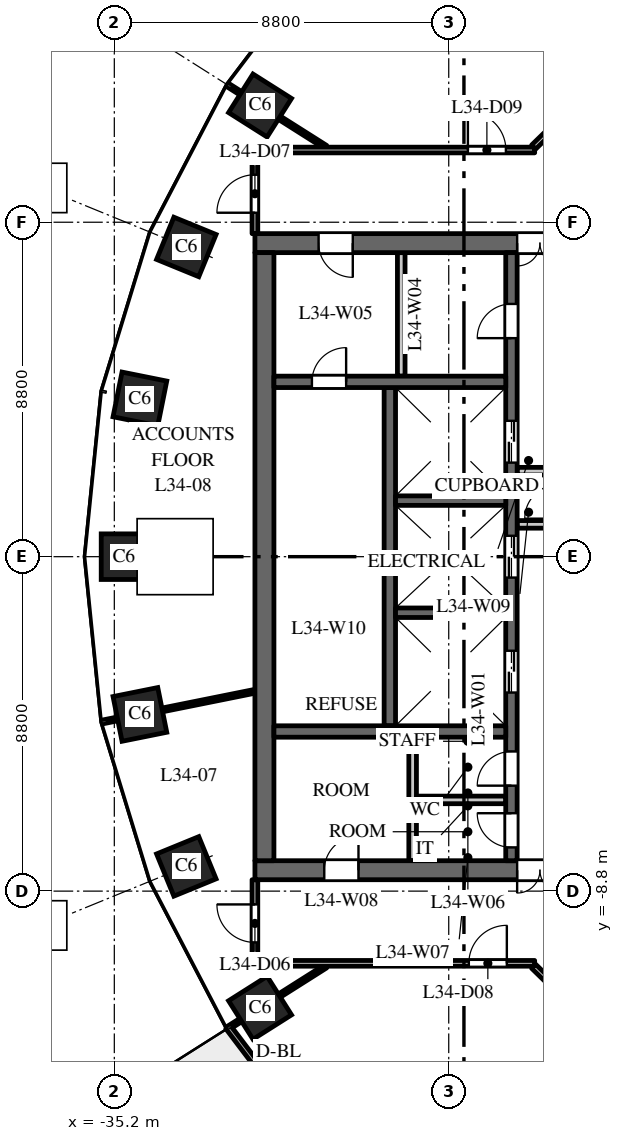
"""IFC4 building model, lengths in metres.
Left out: names, types, materials, properties, quantities, classifications, styles, units other than length and angle.
Written with IfcOpenShell. Run it as: python <this file> out.ifc"""

import sys

from ifc_helpers import new_model, si_unit, direction, frame, frame_2d, origin, origin_2d, place, context, subcontext, project, spatial, rectangle, extrude, element, fill, save


model = new_model("IFC4")
c1 = context("Model", 3, precision=1e-05, world=origin(), true_north=direction((0.0, 1.0)))
c2 = subcontext(c1, "Body", "Model", "MODEL_VIEW")
j1 = project(units=[si_unit("LENGTHUNIT", "METRE"), si_unit("PLANEANGLEUNIT", "RADIAN")], contexts=[c1])
p1 = place(None, origin())
s1 = spatial("IfcSite", under=j1, at=p1, CompositionType="ELEMENT")
p2 = place(p1, origin())
s2 = spatial("IfcBuilding", under=s1, at=p2, CompositionType="ELEMENT")
p3 = place(p2, frame((0.0, 0.0, 150.0)))
s3 = spatial("IfcBuildingStorey", under=s2, at=p3, CompositionType="ELEMENT", Elevation=150.0)
for number, where, z_axis, x_axis in (
    (1, (-31.365, 11.871, 0.0), (0.0, 0.0, 1.0), (-0.535, -0.845, 0.0)),
    (2, (-33.305, 8.149, 0.0), (0.0, 0.0, 1.0), (-0.379, -0.925, 0.0)),
    (3, (-34.527, 4.151, 0.0), (0.0, 0.0, 1.0), (-0.197, -0.98, 0.0)),
    (4, (-34.945, 0.0, 0.0), (0.0, 0.0, 1.0), (0.0, -1.0, 0.0)),
    (5, (-34.527, -4.151, 0.0), (0.0, 0.0, 1.0), (0.197, -0.98, 0.0)),
    (6, (-33.305, -8.149, 0.0), (0.0, 0.0, 1.0), (0.379, -0.925, 0.0)),
    (7, (-31.365, -11.871, 0.0), (0.0, 0.0, 1.0), (0.535, -0.845, 0.0)),
):
    element("IfcColumn", number, at=place(p3, frame(where, z_axis=z_axis, x_axis=x_axis)), inside=s3, PredefinedType="COLUMN", context=c2, shape_type="SweptSolid", body=[
        extrude(rectangle(XDim=1.2, YDim=1.2, at=origin_2d()), origin(), (0.0, 0.0, 1.0), 4.0),
    ])
p4 = place(p3, frame((-16.5, 8.25, 0.0), z_axis=(0.0, 0.0, 1.0), x_axis=(-1.0, 0.0, 0.0)))
e8 = element("IfcWall", 8, at=p4, inside=s3, PredefinedType="SHEAR", context=c2, shape_type="SweptSolid", body=[
    extrude(rectangle(XDim=15.0, YDim=0.5, at=frame_2d((7.5, 0.0))), origin(), (0.0, 0.0, 1.0), 3.7),
])
p5 = place(p4, frame((6.9, 0.0, 0.0)))
e9 = element("IfcOpeningElement", 9, at=p5, cuts=e8, PredefinedType="OPENING", context=c2, shape_type="SweptSolid", body=[
    extrude(rectangle(XDim=1.2, YDim=2.1, at=frame_2d((0.6, 1.05))), frame((0.0, 0.26, 0.0), z_axis=(0.0, -1.0, 0.0), x_axis=(1.0, 0.0, 0.0)), (0.0, 0.0, 1.0), 0.52),
])
p6 = place(p4, frame((12.425, 0.0, 0.0)))
e10 = element("IfcOpeningElement", 10, at=p6, cuts=e8, PredefinedType="OPENING", context=c2, shape_type="SweptSolid", body=[
    extrude(rectangle(XDim=0.9, YDim=2.1, at=frame_2d((0.45, 1.05))), frame((0.0, 0.26, 0.0), z_axis=(0.0, -1.0, 0.0), x_axis=(1.0, 0.0, 0.0)), (0.0, 0.0, 1.0), 0.52),
])
p7 = place(p3, frame((-16.5, -8.25, 0.0), z_axis=(0.0, 0.0, 1.0), x_axis=(-1.0, 0.0, 0.0)))
e11 = element("IfcWall", 11, at=p7, inside=s3, PredefinedType="SHEAR", context=c2, shape_type="SweptSolid", body=[
    extrude(rectangle(XDim=15.0, YDim=0.5, at=frame_2d((7.5, 0.0))), origin(), (0.0, 0.0, 1.0), 3.7),
])
p8 = place(p7, frame((6.9, 0.0, 0.0)))
e12 = element("IfcOpeningElement", 12, at=p8, cuts=e11, PredefinedType="OPENING", context=c2, shape_type="SweptSolid", body=[
    extrude(rectangle(XDim=1.2, YDim=2.1, at=frame_2d((0.6, 1.05))), frame((0.0, 0.26, 0.0), z_axis=(0.0, -1.0, 0.0), x_axis=(1.0, 0.0, 0.0)), (0.0, 0.0, 1.0), 0.52),
])
p9 = place(p7, frame((12.275, 0.0, 0.0)))
e13 = element("IfcOpeningElement", 13, at=p9, cuts=e11, PredefinedType="OPENING", context=c2, shape_type="SweptSolid", body=[
    extrude(rectangle(XDim=0.9, YDim=2.1, at=frame_2d((0.45, 1.05))), frame((0.0, 0.26, 0.0), z_axis=(0.0, -1.0, 0.0), x_axis=(1.0, 0.0, 0.0)), (0.0, 0.0, 1.0), 0.52),
])
p10 = place(p3, frame((-27.95, -4.45, 0.0), z_axis=(0.0, 0.0, 1.0), x_axis=(0.0, 1.0, 0.0)))
e14 = element("IfcWall", 14, at=p10, inside=s3, PredefinedType="SHEAR", context=c2, shape_type="SweptSolid", body=[
    extrude(rectangle(XDim=8.9, YDim=0.3, at=frame_2d((4.45, 0.0))), origin(), (0.0, 0.0, 1.0), 3.7),
])
p11 = place(p3, frame((-24.75, -8.0, 0.0), z_axis=(0.0, 0.0, 1.0), x_axis=(0.0, 1.0, 0.0)))
e15 = element("IfcWall", 15, at=p11, inside=s3, PredefinedType="SHEAR", context=c2, shape_type="SweptSolid", body=[
    extrude(rectangle(XDim=16.0, YDim=0.3, at=frame_2d((8.0, 0.0))), origin(), (0.0, 0.0, 1.0), 3.7),
])
p12 = place(p11, frame((4.425, 0.0, 0.0)))
e16 = element("IfcOpeningElement", 16, at=p12, cuts=e15, PredefinedType="OPENING", context=c2, shape_type="SweptSolid", body=[
    extrude(rectangle(XDim=1.1, YDim=2.1, at=frame_2d((0.55, 1.05))), frame((0.0, 0.16, 0.0), z_axis=(0.0, -1.0, 0.0), x_axis=(1.0, 0.0, 0.0)), (0.0, 0.0, 1.0), 0.32),
])
p13 = place(p11, frame((7.45, 0.0, 0.0)))
e17 = element("IfcOpeningElement", 17, at=p13, cuts=e15, PredefinedType="OPENING", context=c2, shape_type="SweptSolid", body=[
    extrude(rectangle(XDim=1.1, YDim=2.1, at=frame_2d((0.55, 1.05))), frame((0.0, 0.16, 0.0), z_axis=(0.0, -1.0, 0.0), x_axis=(1.0, 0.0, 0.0)), (0.0, 0.0, 1.0), 0.32),
])
p14 = place(p11, frame((10.475, 0.0, 0.0)))
e18 = element("IfcOpeningElement", 18, at=p14, cuts=e15, PredefinedType="OPENING", context=c2, shape_type="SweptSolid", body=[
    extrude(rectangle(XDim=1.1, YDim=2.1, at=frame_2d((0.55, 1.05))), frame((0.0, 0.16, 0.0), z_axis=(0.0, -1.0, 0.0), x_axis=(1.0, 0.0, 0.0)), (0.0, 0.0, 1.0), 0.32),
])
p15 = place(p11, frame((13.75, 0.0, 0.0)))
e19 = element("IfcOpeningElement", 19, at=p15, cuts=e15, PredefinedType="OPENING", context=c2, shape_type="SweptSolid", body=[
    extrude(rectangle(XDim=0.9, YDim=2.1, at=frame_2d((0.45, 1.05))), frame((0.0, 0.16, 0.0), z_axis=(0.0, -1.0, 0.0), x_axis=(1.0, 0.0, 0.0)), (0.0, 0.0, 1.0), 0.32),
])
p16 = place(p11, frame((1.975, 0.0, 0.0)))
e20 = element("IfcOpeningElement", 20, at=p16, cuts=e15, PredefinedType="OPENING", context=c2, shape_type="SweptSolid", body=[
    extrude(rectangle(XDim=0.9, YDim=2.1, at=frame_2d((0.45, 1.05))), frame((0.0, 0.16, 0.0), z_axis=(0.0, -1.0, 0.0), x_axis=(1.0, 0.0, 0.0)), (0.0, 0.0, 1.0), 0.32),
])
p17 = place(p11, frame((0.35, 0.0, 0.0)))
e21 = element("IfcOpeningElement", 21, at=p17, cuts=e15, PredefinedType="OPENING", context=c2, shape_type="SweptSolid", body=[
    extrude(rectangle(XDim=0.9, YDim=2.1, at=frame_2d((0.45, 1.05))), frame((0.0, 0.16, 0.0), z_axis=(0.0, -1.0, 0.0), x_axis=(1.0, 0.0, 0.0)), (0.0, 0.0, 1.0), 0.32),
])
for number, where, z_axis, x_axis in (
    (22, (-23.4, 0.85, 0.0), (0.0, 0.0, 1.0), (-1.0, 0.0, 0.0)),
    (23, (-23.4, 2.25, 0.0), (0.0, 0.0, 1.0), (-1.0, 0.0, 0.0)),
):
    element("IfcWall", number, at=place(p3, frame(where, z_axis=z_axis, x_axis=x_axis)), inside=s3, PredefinedType="PARTITIONING", context=c2, shape_type="SweptSolid", body=[
        extrude(rectangle(XDim=1.2, YDim=0.2, at=frame_2d((0.6, 0.0))), origin(), (0.0, 0.0, 1.0), 3.7),
    ])
p18 = place(p3, frame((-31.25, -8.0, 0.0), z_axis=(0.0, 0.0, 1.0), x_axis=(0.0, 1.0, 0.0)))
e24 = element("IfcWall", 24, at=p18, inside=s3, PredefinedType="SHEAR", context=c2, shape_type="SweptSolid", body=[
    extrude(rectangle(XDim=16.0, YDim=0.5, at=frame_2d((8.0, 0.0))), origin(), (0.0, 0.0, 1.0), 3.7),
])
p19 = place(p3, frame((-24.9, 4.6, 0.0), z_axis=(0.0, 0.0, 1.0), x_axis=(-1.0, 0.0, 0.0)))
e25 = element("IfcWall", 25, at=p19, inside=s3, PredefinedType="SHEAR", context=c2, shape_type="SweptSolid", body=[
    extrude(rectangle(XDim=6.1, YDim=0.3, at=frame_2d((3.05, 0.0))), origin(), (0.0, 0.0, 1.0), 3.7),
])
p20 = place(p19, frame((4.2, 0.0, 0.0)))
e26 = element("IfcOpeningElement", 26, at=p20, cuts=e25, PredefinedType="OPENING", context=c2, shape_type="SweptSolid", body=[
    extrude(rectangle(XDim=0.9, YDim=2.1, at=frame_2d((0.45, 1.05))), frame((0.0, 0.16, 0.0), z_axis=(0.0, -1.0, 0.0), x_axis=(1.0, 0.0, 0.0)), (0.0, 0.0, 1.0), 0.32),
])
for number, where, z_axis, x_axis in (
    (27, (-27.65, 4.75, 0.0), (0.0, 0.0, 1.0), (0.0, 1.0, 0.0)),
    (28, (-27.35, -8.0, 0.0), (0.0, 0.0, 1.0), (0.0, 1.0, 0.0)),
):
    element("IfcWall", number, at=place(p3, frame(where, z_axis=z_axis, x_axis=x_axis)), inside=s3, PredefinedType="PARTITIONING", context=c2, shape_type="SweptSolid", body=[
        extrude(rectangle(XDim=3.25, YDim=0.2, at=frame_2d((1.625, 0.0))), origin(), (0.0, 0.0, 1.0), 3.7),
    ])
p21 = place(p3, frame((-24.9, -6.4, 0.0), z_axis=(0.0, 0.0, 1.0), x_axis=(-1.0, 0.0, 0.0)))
e29 = element("IfcWall", 29, at=p21, inside=s3, PredefinedType="PARTITIONING", context=c2, shape_type="SweptSolid", body=[
    extrude(rectangle(XDim=2.35, YDim=0.2, at=frame_2d((1.175, 0.0))), origin(), (0.0, 0.0, 1.0), 3.7),
])
p22 = place(p3, frame((-24.9, -4.6, 0.0), z_axis=(0.0, 0.0, 1.0), x_axis=(-1.0, 0.0, 0.0)))
e30 = element("IfcWall", 30, at=p22, inside=s3, PredefinedType="SHEAR", context=c2, shape_type="SweptSolid", body=[
    extrude(rectangle(XDim=6.1, YDim=0.3, at=frame_2d((3.05, 0.0))), origin(), (0.0, 0.0, 1.0), 3.7),
])
for number, where, z_axis, x_axis in (
    (31, (-24.9, -1.475, 0.0), (0.0, 0.0, 1.0), (-1.0, 0.0, 0.0)),
    (32, (-24.9, 1.475, 0.0), (0.0, 0.0, 1.0), (-1.0, 0.0, 0.0)),
):
    element("IfcWall", number, at=place(p3, frame(where, z_axis=z_axis, x_axis=x_axis)), inside=s3, PredefinedType="SHEAR", context=c2, shape_type="SweptSolid", body=[
        extrude(rectangle(XDim=2.9, YDim=0.25, at=frame_2d((1.45, 0.0))), origin(), (0.0, 0.0, 1.0), 3.7),
    ])
p23 = place(p3, frame((-32.208, -12.374, 0.0), z_axis=(0.0, 0.0, 1.0), x_axis=(0.604045763106, -0.796949632081, 0.0)))
e33 = element("IfcWall", 33, at=p23, inside=s3, PredefinedType="STANDARD", context=c2, shape_type="SweptSolid", body=[
    extrude(rectangle(XDim=4.423, YDim=0.15, at=frame_2d((2.212, 0.0))), origin(), (0.0, 0.0, 1.0), 3.7),
])
p24 = place(p23, frame((1.712, 0.0, 0.0)))
e34 = element("IfcOpeningElement", 34, at=p24, cuts=e33, PredefinedType="OPENING", context=c2, shape_type="SweptSolid", body=[
    extrude(rectangle(XDim=1.0, YDim=2.4, at=frame_2d((0.5, 1.2))), frame((0.0, 0.085, 0.0), z_axis=(0.0, -1.0, 0.0), x_axis=(1.0, 0.0, 0.0)), (0.0, 0.0, 1.0), 0.17),
])
p25 = place(p3, frame((-35.512, -4.349, 0.0), z_axis=(0.0, 0.0, 1.0), x_axis=(0.980357474535, 0.197228857227, 0.0)))
e35 = element("IfcWall", 35, at=p25, inside=s3, PredefinedType="PARTITIONING", context=c2, shape_type="SweptSolid", body=[
    extrude(rectangle(XDim=4.092, YDim=0.1, at=frame_2d((2.046, 0.0))), origin(), (0.0, 0.0, 1.0), 3.2),
])
for number, where, z_axis, x_axis in (
    (36, (-32.212, -12.408, 0.0), (0.0, 0.0, 1.0), (0.845, 0.535, 0.0)),
    (37, (-32.212, 12.408, 0.0), (0.0, 0.0, 1.0), (0.845, -0.535, 0.0)),
):
    element("IfcWall", number, at=place(p3, frame(where, z_axis=z_axis, x_axis=x_axis)), inside=s3, PredefinedType="PARTITIONING", context=c2, shape_type="SweptSolid", body=[
        extrude(rectangle(XDim=3.048, YDim=0.1, at=frame_2d((1.524, 0.0))), origin(), (0.0, 0.0, 1.0), 3.7),
    ])
p26 = place(p3, frame((-31.5, -10.7, 0.0), z_axis=(0.0, 0.0, 1.0), x_axis=(0.0, 1.0, 0.0)))
e38 = element("IfcWall", 38, at=p26, inside=s3, PredefinedType="PARTITIONING", context=c2, shape_type="SweptSolid", body=[
    extrude(rectangle(XDim=2.2, YDim=0.15, at=frame_2d((1.1, 0.0))), origin(), (0.0, 0.0, 1.0), 3.7),
])
p27 = place(p26, frame((0.55, 0.0, 0.0)))
e39 = element("IfcOpeningElement", 39, at=p27, cuts=e38, PredefinedType="OPENING", context=c2, shape_type="SweptSolid", body=[
    extrude(rectangle(XDim=1.0, YDim=2.1, at=frame_2d((0.5, 1.05))), frame((0.0, 0.085, 0.0), z_axis=(0.0, -1.0, 0.0), x_axis=(1.0, 0.0, 0.0)), (0.0, 0.0, 1.0), 0.17),
])
p28 = place(p3, frame((-31.5, -10.7, 0.0), z_axis=(0.0, 0.0, 1.0), x_axis=(1.0, 0.0, 0.0)))
e40 = element("IfcWall", 40, at=p28, inside=s3, PredefinedType="PARTITIONING", context=c2, shape_type="SweptSolid", body=[
    extrude(rectangle(XDim=7.361, YDim=0.15, at=frame_2d((3.681, 0.0))), origin(), (0.0, 0.0, 1.0), 3.1),
])
p29 = place(p28, frame((5.629, 0.0, 0.0)))
e41 = element("IfcOpeningElement", 41, at=p29, cuts=e40, PredefinedType="OPENING", context=c2, shape_type="SweptSolid", body=[
    extrude(rectangle(XDim=1.0, YDim=2.1, at=frame_2d((0.5, 1.05))), frame((0.0, 0.085, 0.0), z_axis=(0.0, -1.0, 0.0), x_axis=(1.0, 0.0, 0.0)), (0.0, 0.0, 1.0), 0.17),
])
p30 = place(p3, frame((-31.5, 8.5, 0.0), z_axis=(0.0, 0.0, 1.0), x_axis=(0.0, 1.0, 0.0)))
e42 = element("IfcWall", 42, at=p30, inside=s3, PredefinedType="PARTITIONING", context=c2, shape_type="SweptSolid", body=[
    extrude(rectangle(XDim=2.2, YDim=0.15, at=frame_2d((1.1, 0.0))), origin(), (0.0, 0.0, 1.0), 3.7),
])
p31 = place(p30, frame((0.55, 0.0, 0.0)))
e43 = element("IfcOpeningElement", 43, at=p31, cuts=e42, PredefinedType="OPENING", context=c2, shape_type="SweptSolid", body=[
    extrude(rectangle(XDim=1.0, YDim=2.1, at=frame_2d((0.5, 1.05))), frame((0.0, 0.085, 0.0), z_axis=(0.0, -1.0, 0.0), x_axis=(1.0, 0.0, 0.0)), (0.0, 0.0, 1.0), 0.17),
])
p32 = place(p3, frame((-31.5, 10.7, 0.0), z_axis=(0.0, 0.0, 1.0), x_axis=(1.0, 0.0, 0.0)))
e44 = element("IfcWall", 44, at=p32, inside=s3, PredefinedType="PARTITIONING", context=c2, shape_type="SweptSolid", body=[
    extrude(rectangle(XDim=7.361, YDim=0.15, at=frame_2d((3.681, 0.0))), origin(), (0.0, 0.0, 1.0), 3.1),
])
p33 = place(p32, frame((5.604, 0.0, 0.0)))
e45 = element("IfcOpeningElement", 45, at=p33, cuts=e44, PredefinedType="OPENING", context=c2, shape_type="SweptSolid", body=[
    extrude(rectangle(XDim=1.0, YDim=2.1, at=frame_2d((0.5, 1.05))), frame((0.0, 0.085, 0.0), z_axis=(0.0, -1.0, 0.0), x_axis=(1.0, 0.0, 0.0)), (0.0, 0.0, 1.0), 0.17),
])
p34 = place(p3, frame((-24.166, -10.778, 0.0), z_axis=(0.0, 0.0, 1.0), x_axis=(0.715834142481, -0.698270349119, 0.0)))
e46 = element("IfcWall", 46, at=p34, inside=s3, PredefinedType="PARTITIONING", context=c2, shape_type="SweptSolid", body=[
    extrude(rectangle(XDim=7.242, YDim=0.15, at=frame_2d((3.621, 0.0))), origin(), (0.0, 0.0, 1.0), 2.75),
])
p35 = place(p3, frame((-24.166, 10.778, 0.0), z_axis=(0.0, 0.0, 1.0), x_axis=(0.715930732039, 0.698171316313, 0.0)))
e47 = element("IfcWall", 47, at=p35, inside=s3, PredefinedType="PARTITIONING", context=c2, shape_type="SweptSolid", body=[
    extrude(rectangle(XDim=3.561, YDim=0.15, at=frame_2d((1.78, 0.0))), origin(), (0.0, 0.0, 1.0), 3.7),
])
p36 = place(p12, origin())
e48 = element("IfcDoor", 48, at=p36, inside=s3, OperationType="DOUBLE_DOOR_SLIDING", PredefinedType="DOOR", context=c2, shape_type="SweptSolid", body=[
    extrude(rectangle(XDim=1.1, YDim=2.1, at=frame_2d((0.55, 1.05))), frame((0.0, 0.025, 0.0), z_axis=(0.0, -1.0, 0.0), x_axis=(1.0, 0.0, 0.0)), (0.0, 0.0, 1.0), 0.05),
])
fill(e16, e48)
p37 = place(p13, origin())
e49 = element("IfcDoor", 49, at=p37, inside=s3, OperationType="DOUBLE_DOOR_SLIDING", PredefinedType="DOOR", context=c2, shape_type="SweptSolid", body=[
    extrude(rectangle(XDim=1.1, YDim=2.1, at=frame_2d((0.55, 1.05))), frame((0.0, 0.025, 0.0), z_axis=(0.0, -1.0, 0.0), x_axis=(1.0, 0.0, 0.0)), (0.0, 0.0, 1.0), 0.05),
])
fill(e17, e49)
p38 = place(p14, origin())
e50 = element("IfcDoor", 50, at=p38, inside=s3, OperationType="DOUBLE_DOOR_SLIDING", PredefinedType="DOOR", context=c2, shape_type="SweptSolid", body=[
    extrude(rectangle(XDim=1.1, YDim=2.1, at=frame_2d((0.55, 1.05))), frame((0.0, 0.025, 0.0), z_axis=(0.0, -1.0, 0.0), x_axis=(1.0, 0.0, 0.0)), (0.0, 0.0, 1.0), 0.05),
])
fill(e18, e50)
p39 = place(p5, origin())
e51 = element("IfcDoor", 51, at=p39, inside=s3, OperationType="DOUBLE_DOOR_DOUBLE_SWING", PredefinedType="DOOR", context=c2, shape_type="SweptSolid", body=[
    extrude(rectangle(XDim=1.2, YDim=2.1, at=frame_2d((0.6, 1.05))), frame((0.0, 0.025, 0.0), z_axis=(0.0, -1.0, 0.0), x_axis=(1.0, 0.0, 0.0)), (0.0, 0.0, 1.0), 0.05),
])
fill(e9, e51)
p40 = place(p8, origin())
e52 = element("IfcDoor", 52, at=p40, inside=s3, OperationType="DOUBLE_DOOR_DOUBLE_SWING", PredefinedType="DOOR", context=c2, shape_type="SweptSolid", body=[
    extrude(rectangle(XDim=1.2, YDim=2.1, at=frame_2d((0.6, 1.05))), frame((0.0, 0.025, 0.0), z_axis=(0.0, -1.0, 0.0), x_axis=(1.0, 0.0, 0.0)), (0.0, 0.0, 1.0), 0.05),
])
fill(e12, e52)
p41 = place(p15, origin())
e53 = element("IfcDoor", 53, at=p41, inside=s3, OperationType="SINGLE_SWING_RIGHT", PredefinedType="DOOR", context=c2, shape_type="SweptSolid", body=[
    extrude(rectangle(XDim=0.9, YDim=2.1, at=frame_2d((0.45, 1.05))), frame((0.0, 0.025, 0.0), z_axis=(0.0, -1.0, 0.0), x_axis=(1.0, 0.0, 0.0)), (0.0, 0.0, 1.0), 0.05),
])
fill(e19, e53)
p42 = place(p6, origin())
e54 = element("IfcDoor", 54, at=p42, inside=s3, OperationType="SINGLE_SWING_RIGHT", PredefinedType="DOOR", context=c2, shape_type="SweptSolid", body=[
    extrude(rectangle(XDim=0.9, YDim=2.1, at=frame_2d((0.45, 1.05))), frame((0.0, 0.025, 0.0), z_axis=(0.0, -1.0, 0.0), x_axis=(1.0, 0.0, 0.0)), (0.0, 0.0, 1.0), 0.05),
])
fill(e10, e54)
p43 = place(p16, origin())
e55 = element("IfcDoor", 55, at=p43, inside=s3, OperationType="SINGLE_SWING_RIGHT", PredefinedType="DOOR", context=c2, shape_type="SweptSolid", body=[
    extrude(rectangle(XDim=0.9, YDim=2.1, at=frame_2d((0.45, 1.05))), frame((0.0, 0.025, 0.0), z_axis=(0.0, -1.0, 0.0), x_axis=(1.0, 0.0, 0.0)), (0.0, 0.0, 1.0), 0.05),
])
fill(e20, e55)
p44 = place(p17, origin())
e56 = element("IfcDoor", 56, at=p44, inside=s3, OperationType="SINGLE_SWING_LEFT", PredefinedType="DOOR", context=c2, shape_type="SweptSolid", body=[
    extrude(rectangle(XDim=0.9, YDim=2.1, at=frame_2d((0.45, 1.05))), frame((0.0, 0.025, 0.0), z_axis=(0.0, -1.0, 0.0), x_axis=(1.0, 0.0, 0.0)), (0.0, 0.0, 1.0), 0.05),
])
fill(e21, e56)
p45 = place(p9, origin())
e57 = element("IfcDoor", 57, at=p45, inside=s3, OperationType="SINGLE_SWING_LEFT", PredefinedType="DOOR", context=c2, shape_type="SweptSolid", body=[
    extrude(rectangle(XDim=0.9, YDim=2.1, at=frame_2d((0.45, 1.05))), frame((0.0, 0.025, 0.0), z_axis=(0.0, -1.0, 0.0), x_axis=(1.0, 0.0, 0.0)), (0.0, 0.0, 1.0), 0.05),
])
fill(e13, e57)
p46 = place(p20, origin())
e58 = element("IfcDoor", 58, at=p46, inside=s3, OperationType="SINGLE_SWING_LEFT", PredefinedType="DOOR", context=c2, shape_type="SweptSolid", body=[
    extrude(rectangle(XDim=0.9, YDim=2.1, at=frame_2d((0.45, 1.05))), frame((0.0, 0.025, 0.0), z_axis=(0.0, -1.0, 0.0), x_axis=(1.0, 0.0, 0.0)), (0.0, 0.0, 1.0), 0.05),
])
fill(e26, e58)
p47 = place(p27, origin())
e59 = element("IfcDoor", 59, at=p47, inside=s3, OperationType="SINGLE_SWING_RIGHT", PredefinedType="DOOR", context=c2, shape_type="SweptSolid", body=[
    extrude(rectangle(XDim=1.0, YDim=2.1, at=frame_2d((0.5, 1.05))), frame((0.0, 0.025, 0.0), z_axis=(0.0, -1.0, 0.0), x_axis=(1.0, 0.0, 0.0)), (0.0, 0.0, 1.0), 0.05),
])
fill(e39, e59)
p48 = place(p31, origin())
e60 = element("IfcDoor", 60, at=p48, inside=s3, OperationType="SINGLE_SWING_LEFT", PredefinedType="DOOR", context=c2, shape_type="SweptSolid", body=[
    extrude(rectangle(XDim=1.0, YDim=2.1, at=frame_2d((0.5, 1.05))), frame((0.0, 0.025, 0.0), z_axis=(0.0, -1.0, 0.0), x_axis=(1.0, 0.0, 0.0)), (0.0, 0.0, 1.0), 0.05),
])
fill(e43, e60)
p49 = place(p29, origin())
e61 = element("IfcDoor", 61, at=p49, inside=s3, OperationType="SINGLE_SWING_RIGHT", PredefinedType="DOOR", context=c2, shape_type="SweptSolid", body=[
    extrude(rectangle(XDim=1.0, YDim=2.1, at=frame_2d((0.5, 1.05))), frame((0.0, 0.025, 0.0), z_axis=(0.0, -1.0, 0.0), x_axis=(1.0, 0.0, 0.0)), (0.0, 0.0, 1.0), 0.05),
])
fill(e41, e61)
p50 = place(p33, origin())
e62 = element("IfcDoor", 62, at=p50, inside=s3, OperationType="SINGLE_SWING_LEFT", PredefinedType="DOOR", context=c2, shape_type="SweptSolid", body=[
    extrude(rectangle(XDim=1.0, YDim=2.1, at=frame_2d((0.5, 1.05))), frame((0.0, 0.025, 0.0), z_axis=(0.0, -1.0, 0.0), x_axis=(1.0, 0.0, 0.0)), (0.0, 0.0, 1.0), 0.05),
])
fill(e45, e62)
save(model, sys.argv[1])
